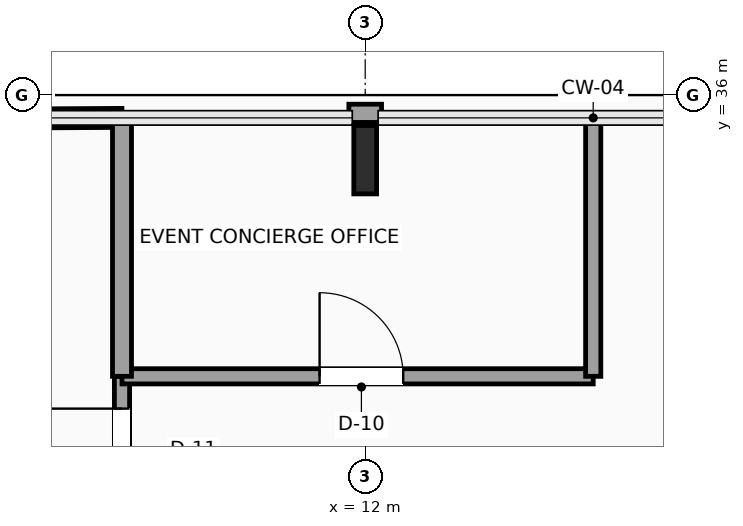
"""IFC4 building model, lengths in metres.
Left out: names, types, materials, properties, quantities, classifications, styles, units other than length and angle.
Written with IfcOpenShell. Run it as: python <this file> out.ifc"""

import sys

from ifc_helpers import new_model, si_unit, direction, frame, frame_2d, origin, origin_2d, place, context, subcontext, project, spatial, rectangle, i_section, extrude, element, fill, save


model = new_model("IFC4")
c1 = context("Model", 3, precision=1e-05, world=origin(), true_north=direction((0.0, 1.0)))
c2 = subcontext(c1, "Body", "Model", "MODEL_VIEW")
j1 = project(units=[si_unit("LENGTHUNIT", "METRE"), si_unit("PLANEANGLEUNIT", "RADIAN")], contexts=[c1])
p1 = place(None, origin())
s1 = spatial("IfcSite", under=j1, at=p1, CompositionType="ELEMENT")
p2 = place(p1, origin())
s2 = spatial("IfcBuilding", under=s1, at=p2, CompositionType="ELEMENT")
p3 = place(p2, frame((0.0, 0.0, 180.45)))
s3 = spatial("IfcBuildingStorey", under=s2, at=p3, CompositionType="ELEMENT", Elevation=180.45)
p4 = place(p3, frame((12.0, 35.15, 0.0), z_axis=(0.0, 0.0, 1.0), x_axis=(1.0, 0.0, 0.0)))
e1 = element("IfcColumn", 1, at=p4, inside=s3, PredefinedType="COLUMN", context=c2, shape_type="SweptSolid", body=[
    extrude(i_section(OverallWidth=0.3, OverallDepth=0.9, WebThickness=0.019, FlangeThickness=0.035, FilletRadius=0.03, at=origin_2d()), origin(), (0.0, 0.0, 1.0), 3.75),
])
p5 = place(p3, frame((11.785, 35.76, 0.0), z_axis=(0.0, 0.0, 1.0), x_axis=(1.0, 0.0, 0.0)))
e2 = element("IfcWall", 2, at=p5, inside=s3, PredefinedType="SOLIDWALL", context=c2, shape_type="SweptSolid", body=[
    extrude(rectangle(XDim=0.43, YDim=0.24, at=frame_2d((0.215, 0.0))), origin(), (0.0, 0.0, 1.0), 3.54),
])
p6 = place(p3, frame((8.8, 30.25, 0.0), z_axis=(0.0, 0.0, 1.0), x_axis=(0.0, 1.0, 0.0)))
e3 = element("IfcWall", 3, at=p6, inside=s3, PredefinedType="SOLIDWALL", context=c2, shape_type="SweptSolid", body=[
    extrude(rectangle(XDim=2.05, YDim=0.2, at=frame_2d((1.025, 0.0))), origin(), (0.0, 0.0, 1.0), 3.54),
])
p7 = place(p6, frame((0.525, 0.0, 0.0)))
e4 = element("IfcOpeningElement", 4, at=p7, cuts=e3, PredefinedType="OPENING", context=c2, shape_type="SweptSolid", body=[
    extrude(rectangle(XDim=1.1, YDim=2.25, at=frame_2d((0.55, 1.125))), frame((0.0, 0.11, 0.0), z_axis=(0.0, -1.0, 0.0), x_axis=(1.0, 0.0, 0.0)), (0.0, 0.0, 1.0), 0.22),
])
p8 = place(p3, frame((8.8, 32.3, 0.0), z_axis=(0.0, 0.0, 1.0), x_axis=(1.0, 0.0, 0.0)))
e5 = element("IfcWall", 5, at=p8, inside=s3, PredefinedType="SOLIDWALL", context=c2, shape_type="SweptSolid", body=[
    extrude(rectangle(XDim=6.2, YDim=0.2, at=frame_2d((3.1, 0.0))), origin(), (0.0, 0.0, 1.0), 3.132),
])
p9 = place(p8, frame((2.6, 0.0, 0.0)))
e6 = element("IfcOpeningElement", 6, at=p9, cuts=e5, PredefinedType="OPENING", context=c2, shape_type="SweptSolid", body=[
    extrude(rectangle(XDim=1.1, YDim=2.25, at=frame_2d((0.55, 1.125))), frame((0.0, 0.11, 0.0), z_axis=(0.0, -1.0, 0.0), x_axis=(1.0, 0.0, 0.0)), (0.0, 0.0, 1.0), 0.22),
])
p10 = place(p3, frame((15.0, 32.3, 0.0), z_axis=(0.0, 0.0, 1.0), x_axis=(0.0, 1.0, 0.0)))
e7 = element("IfcWall", 7, at=p10, inside=s3, PredefinedType="SOLIDWALL", context=c2, shape_type="SweptSolid", body=[
    extrude(rectangle(XDim=3.4, YDim=0.2, at=frame_2d((1.7, 0.0))), origin(), (0.0, 0.0, 1.0), 3.54),
])
p11 = place(p3, frame((0.35, 35.65, 0.0), z_axis=(0.0, 0.0, 1.0), x_axis=(0.99998245966, 0.005922868574, 0.0)))
e8 = element("IfcWall", 8, at=p11, inside=s3, PredefinedType="PARTITIONING", context=c2, shape_type="SweptSolid", body=[
    extrude(rectangle(XDim=8.45, YDim=0.25, at=frame_2d((4.225, 0.0))), origin(), (0.0, 0.0, 1.0), 3.54),
])
p12 = place(p3, frame((8.8, 32.3, 0.0), z_axis=(0.0, 0.0, 1.0), x_axis=(0.0, 1.0, 0.0)))
e9 = element("IfcWall", 9, at=p12, inside=s3, PredefinedType="PARTITIONING", context=c2, shape_type="SweptSolid", body=[
    extrude(rectangle(XDim=3.4, YDim=0.25, at=frame_2d((1.7, 0.0))), origin(), (0.0, 0.0, 1.0), 3.54),
])
p13 = place(p7, origin())
e10 = element("IfcDoor", 10, at=p13, inside=s3, OperationType="SINGLE_SWING_RIGHT", PredefinedType="DOOR", context=c2, shape_type="SweptSolid", body=[
    extrude(rectangle(XDim=1.1, YDim=2.25, at=frame_2d((0.55, 1.125))), frame((0.0, 0.025, 0.0), z_axis=(0.0, -1.0, 0.0), x_axis=(1.0, 0.0, 0.0)), (0.0, 0.0, 1.0), 0.05),
])
fill(e4, e10)
p14 = place(p9, origin())
e11 = element("IfcDoor", 11, at=p14, inside=s3, OperationType="SINGLE_SWING_LEFT", PredefinedType="DOOR", context=c2, shape_type="SweptSolid", body=[
    extrude(rectangle(XDim=1.1, YDim=2.25, at=frame_2d((0.55, 1.125))), frame((0.0, 0.025, 0.0), z_axis=(0.0, -1.0, 0.0), x_axis=(1.0, 0.0, 0.0)), (0.0, 0.0, 1.0), 0.05),
])
fill(e6, e11)
save(model, sys.argv[1])
